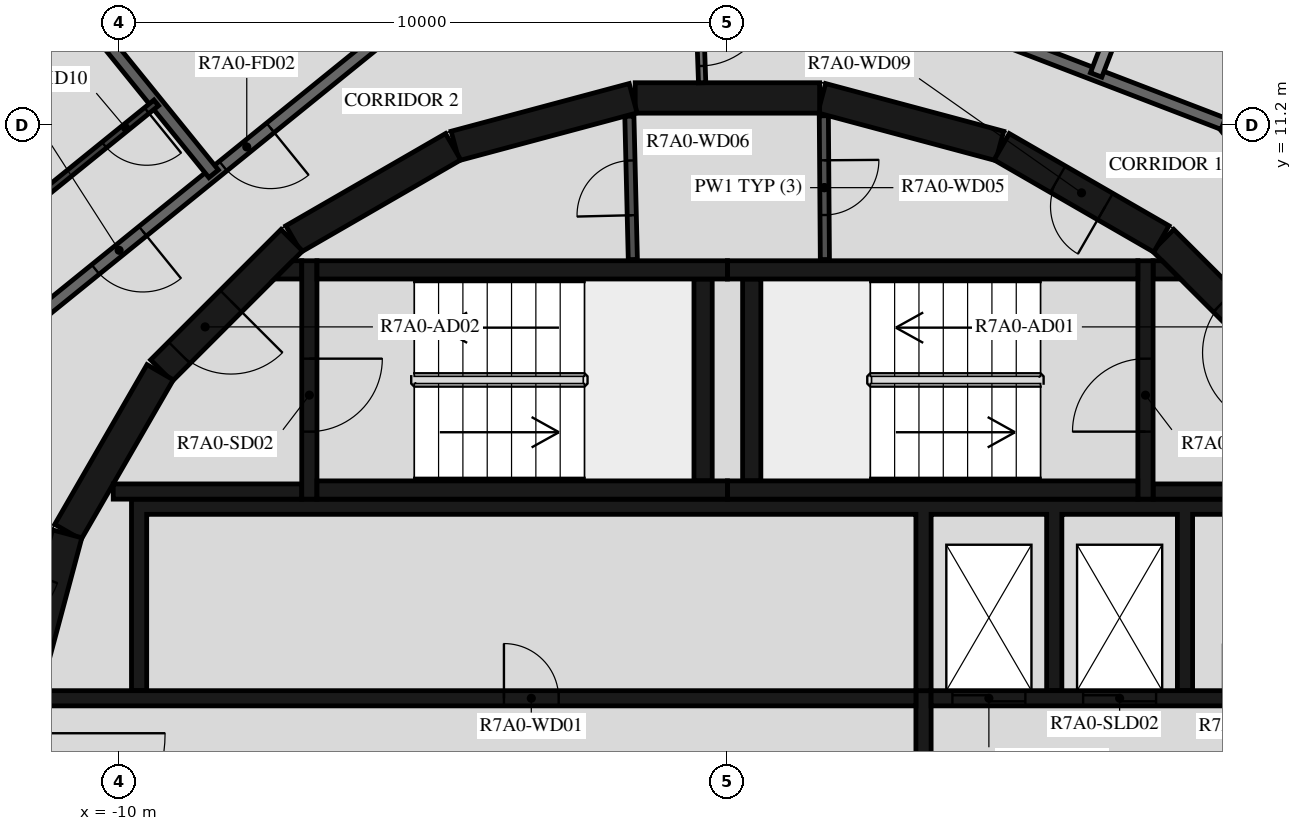
"""IFC4 building model, lengths in metres.
Left out: names, types, materials, properties, quantities, classifications, styles, units other than length and angle.
Written with IfcOpenShell. Run it as: python <this file> out.ifc"""

import sys

from ifc_helpers import new_model, si_unit, direction, frame, frame_2d, origin, place, context, subcontext, project, spatial, polyline, rectangle, outline, extrude, element, fill, save


model = new_model("IFC4")
c1 = context("Model", 3, precision=1e-05, world=origin(), true_north=direction((0.0, 1.0)))
c2 = subcontext(c1, "Body", "Model", "MODEL_VIEW")
j1 = project(units=[si_unit("LENGTHUNIT", "METRE"), si_unit("PLANEANGLEUNIT", "RADIAN")], contexts=[c1])
p1 = place(None, origin())
s1 = spatial("IfcSite", under=j1, at=p1, CompositionType="ELEMENT")
p2 = place(p1, origin())
s2 = spatial("IfcBuilding", under=s1, at=p2, CompositionType="ELEMENT")
p3 = place(p2, frame((0.0, 0.0, 263.4)))
s3 = spatial("IfcBuildingStorey", under=s2, at=p3, CompositionType="ELEMENT", Elevation=263.4)
p4 = place(p3, frame((-6.133, 25.046, 0.03), z_axis=(0.0, 0.0, 1.0), x_axis=(0.887010202007, -0.461749825701, 0.0)))
e1 = element("IfcWall", 1, at=p4, inside=s3, PredefinedType="PARAPET", context=c2, shape_type="SweptSolid", body=[
    extrude(rectangle(XDim=34.009, YDim=0.2, at=frame_2d((17.004, 0.0))), origin(), (0.0, 0.0, 1.0), 1.5),
])
p5 = place(p3, frame((9.308, 7.164, 0.0), z_axis=(0.0, 0.0, 1.0), x_axis=(-0.707106781187, 0.707106781187, 0.0)))
e2 = element("IfcWall", 2, at=p5, inside=s3, PredefinedType="SHEAR", context=c2, shape_type="SweptSolid", body=[
    extrude(rectangle(XDim=3.032, YDim=0.5, at=frame_2d((1.516, 0.0))), origin(), (0.0, 0.0, 1.0), 3.12),
])
p6 = place(p5, frame((0.416, 0.0, 0.0)))
e3 = element("IfcOpeningElement", 3, at=p6, cuts=e2, PredefinedType="OPENING", context=c2, shape_type="SweptSolid", body=[
    extrude(rectangle(XDim=1.2, YDim=2.1, at=frame_2d((0.6, 1.05))), frame((0.0, 0.26, 0.0), z_axis=(0.0, -1.0, 0.0), x_axis=(1.0, 0.0, 0.0)), (0.0, 0.0, 1.0), 0.52),
])
p7 = place(p3, frame((7.137, 9.329, 0.0), z_axis=(0.0, 0.0, 1.0), x_axis=(-0.865975092491, 0.500087131594, 0.0)))
e4 = element("IfcWall", 4, at=p7, inside=s3, PredefinedType="SHEAR", context=c2, shape_type="SweptSolid", body=[
    extrude(rectangle(XDim=3.033, YDim=0.5, at=frame_2d((1.516, 0.0))), origin(), (0.0, 0.0, 1.0), 3.12),
])
p8 = place(p7, frame((1.066, 0.0, 0.0)))
e5 = element("IfcOpeningElement", 5, at=p8, cuts=e4, PredefinedType="OPENING", context=c2, shape_type="SweptSolid", body=[
    extrude(rectangle(XDim=0.9, YDim=2.1, at=frame_2d((0.45, 1.05))), frame((0.0, 0.26, 0.0), z_axis=(0.0, -1.0, 0.0), x_axis=(1.0, 0.0, 0.0)), (0.0, 0.0, 1.0), 0.52),
])
for number, where, z_axis, x_axis in (
    (6, (4.479, 10.858, 0.0), (0.0, 0.0, 1.0), (-0.966, 0.259, 0.0)),
    (7, (1.516, 11.647, 0.0), (0.0, 0.0, 1.0), (-1.0, 0.0, 0.0)),
    (8, (-1.55, 11.643, 0.0), (0.0, 0.0, 1.0), (-0.966, -0.259, 0.0)),
    (9, (-4.51, 10.845, 0.0), (0.0, 0.0, 1.0), (-0.866, -0.5, 0.0)),
):
    element("IfcWall", number, at=place(p3, frame(where, z_axis=z_axis, x_axis=x_axis)), inside=s3, PredefinedType="SHEAR", context=c2, shape_type="SweptSolid", body=[
        extrude(rectangle(XDim=3.033, YDim=0.5, at=frame_2d((1.516, 0.0))), origin(), (0.0, 0.0, 1.0), 3.12),
    ])
p9 = place(p3, frame((-7.164, 9.308, 0.0), z_axis=(0.0, 0.0, 1.0), x_axis=(-0.707106781187, -0.707106781187, 0.0)))
e10 = element("IfcWall", 10, at=p9, inside=s3, PredefinedType="SHEAR", context=c2, shape_type="SweptSolid", body=[
    extrude(rectangle(XDim=3.032, YDim=0.5, at=frame_2d((1.516, 0.0))), origin(), (0.0, 0.0, 1.0), 3.12),
])
p10 = place(p9, frame((1.416, 0.0, 0.0)))
e11 = element("IfcOpeningElement", 11, at=p10, cuts=e10, PredefinedType="OPENING", context=c2, shape_type="SweptSolid", body=[
    extrude(rectangle(XDim=1.2, YDim=2.1, at=frame_2d((0.6, 1.05))), frame((0.0, 0.26, 0.0), z_axis=(0.0, -1.0, 0.0), x_axis=(1.0, 0.0, 0.0)), (0.0, 0.0, 1.0), 0.52),
])
for number, where, z_axis, x_axis in (
    (12, (-9.329, 7.137, 0.0), (0.0, 0.0, 1.0), (-0.5, -0.866, 0.0)),
    (13, (-10.858, 4.479, 0.0), (0.0, 0.0, 1.0), (-0.259, -0.966, 0.0)),
):
    element("IfcWall", number, at=place(p3, frame(where, z_axis=z_axis, x_axis=x_axis)), inside=s3, PredefinedType="SHEAR", context=c2, shape_type="SweptSolid", body=[
        extrude(rectangle(XDim=3.033, YDim=0.5, at=frame_2d((1.516, 0.0))), origin(), (0.0, 0.0, 1.0), 3.12),
    ])
for number, where, z_axis, x_axis in (
    (14, (0.0, 5.2, 0.0), (0.0, 0.0, 1.0), (1.0, 0.0, 0.0)),
    (15, (0.0, 8.82, 0.0), (0.0, 0.0, 1.0), (1.0, 0.0, 0.0)),
):
    element("IfcWall", number, at=place(p3, frame(where, z_axis=z_axis, x_axis=x_axis)), inside=s3, PredefinedType="SHEAR", context=c2, shape_type="SweptSolid", body=[
        extrude(rectangle(XDim=6.75, YDim=0.3, at=frame_2d((3.375, 0.0))), origin(), (0.0, 0.0, 1.0), 3.12),
    ])
p11 = place(p3, frame((0.4, 5.35, 0.0), z_axis=(0.0, 0.0, 1.0), x_axis=(0.0, 1.0, 0.0)))
e16 = element("IfcWall", 16, at=p11, inside=s3, PredefinedType="SHEAR", context=c2, shape_type="SweptSolid", body=[
    extrude(rectangle(XDim=3.32, YDim=0.3, at=frame_2d((1.66, 0.0))), origin(), (0.0, 0.0, 1.0), 3.12),
])
p12 = place(p3, frame((6.875, 5.05, 0.0), z_axis=(0.0, 0.0, 1.0), x_axis=(0.0, 1.0, 0.0)))
e17 = element("IfcWall", 17, at=p12, inside=s3, PredefinedType="SHEAR", context=c2, shape_type="SweptSolid", body=[
    extrude(rectangle(XDim=3.92, YDim=0.25, at=frame_2d((1.96, 0.0))), origin(), (0.0, 0.0, 1.0), 3.12),
])
p13 = place(p12, frame((1.11, 0.0, 0.0)))
e18 = element("IfcOpeningElement", 18, at=p13, cuts=e17, PredefinedType="OPENING", context=c2, shape_type="SweptSolid", body=[
    extrude(rectangle(XDim=1.2, YDim=2.1, at=frame_2d((0.6, 1.05))), frame((0.0, 0.135, 0.0), z_axis=(0.0, -1.0, 0.0), x_axis=(1.0, 0.0, 0.0)), (0.0, 0.0, 1.0), 0.27),
])
p14 = place(p3, frame((7.0, 5.175, 0.0), z_axis=(0.0, 0.0, 1.0), x_axis=(1.0, 0.0, 0.0)))
e19 = element("IfcWall", 19, at=p14, inside=s3, PredefinedType="SHEAR", context=c2, shape_type="SweptSolid", body=[
    extrude(rectangle(XDim=3.1, YDim=0.25, at=frame_2d((1.55, 0.0))), origin(), (0.0, 0.0, 1.0), 3.12),
])
p15 = place(p3, origin())
e20 = element("IfcWall", 20, at=p15, inside=s3, PredefinedType="SHEAR", context=c2, shape_type="SweptSolid", body=[
    extrude(outline(polyline([(7.448, 8.67), (7.0, 8.67), (7.0, 8.97), (7.148, 8.97), (7.448, 8.67)])), origin(), (0.0, 0.0, 1.0), 3.12),
])
for number, where, z_axis, x_axis in (
    (21, (-6.75, 5.2, 0.0), (0.0, 0.0, 1.0), (1.0, 0.0, 0.0)),
    (22, (-6.75, 8.82, 0.0), (0.0, 0.0, 1.0), (1.0, 0.0, 0.0)),
):
    element("IfcWall", number, at=place(p3, frame(where, z_axis=z_axis, x_axis=x_axis)), inside=s3, PredefinedType="SHEAR", context=c2, shape_type="SweptSolid", body=[
        extrude(rectangle(XDim=6.75, YDim=0.3, at=frame_2d((3.375, 0.0))), origin(), (0.0, 0.0, 1.0), 3.12),
    ])
p16 = place(p3, frame((-0.4, 5.35, 0.0), z_axis=(0.0, 0.0, 1.0), x_axis=(0.0, 1.0, 0.0)))
e23 = element("IfcWall", 23, at=p16, inside=s3, PredefinedType="SHEAR", context=c2, shape_type="SweptSolid", body=[
    extrude(rectangle(XDim=3.32, YDim=0.3, at=frame_2d((1.66, 0.0))), origin(), (0.0, 0.0, 1.0), 3.12),
])
p17 = place(p3, frame((-6.875, 8.97, 0.0), z_axis=(0.0, 0.0, 1.0), x_axis=(0.0, -1.0, 0.0)))
e24 = element("IfcWall", 24, at=p17, inside=s3, PredefinedType="SHEAR", context=c2, shape_type="SweptSolid", body=[
    extrude(rectangle(XDim=3.92, YDim=0.25, at=frame_2d((1.96, 0.0))), origin(), (0.0, 0.0, 1.0), 3.12),
])
p18 = place(p17, frame((1.61, 0.0, 0.0)))
e25 = element("IfcOpeningElement", 25, at=p18, cuts=e24, PredefinedType="OPENING", context=c2, shape_type="SweptSolid", body=[
    extrude(rectangle(XDim=1.2, YDim=2.1, at=frame_2d((0.6, 1.05))), frame((0.0, 0.135, 0.0), z_axis=(0.0, -1.0, 0.0), x_axis=(1.0, 0.0, 0.0)), (0.0, 0.0, 1.0), 0.27),
])
p19 = place(p3, frame((-7.0, 5.175, 0.0), z_axis=(0.0, 0.0, 1.0), x_axis=(-1.0, 0.0, 0.0)))
e26 = element("IfcWall", 26, at=p19, inside=s3, PredefinedType="SHEAR", context=c2, shape_type="SweptSolid", body=[
    extrude(rectangle(XDim=3.1, YDim=0.25, at=frame_2d((1.55, 0.0))), origin(), (0.0, 0.0, 1.0), 3.12),
])
p20 = place(p3, origin())
e27 = element("IfcWall", 27, at=p20, inside=s3, PredefinedType="SHEAR", context=c2, shape_type="SweptSolid", body=[
    extrude(outline(polyline([(-7.148, 8.97), (-7.0, 8.97), (-7.0, 8.67), (-7.448, 8.67), (-7.148, 8.97)])), origin(), (0.0, 0.0, 1.0), 3.12),
])
p21 = place(p3, origin())
e28 = element("IfcWall", 28, at=p21, inside=s3, PredefinedType="SHEAR", context=c2, shape_type="SweptSolid", body=[
    extrude(outline(polyline([(-9.8, 1.9), (-9.55, 1.9), (-9.55, 4.8), (3.1, 4.8), (3.1, 1.9), (3.35, 1.9), (3.35, 4.8), (5.25, 4.8), (5.25, 1.9), (5.5, 1.9), (5.5, 4.8), (7.4, 4.8), (7.4, 1.9), (7.65, 1.9), (7.65, 4.8), (9.55, 4.8), (9.55, 1.9), (9.8, 1.9), (9.8, 4.8), (9.8, 5.05), (-9.8, 5.05), (-9.8, 4.8), (-9.8, 1.9)])), origin(), (0.0, 0.0, 1.0), 3.12),
])
p22 = place(p3, frame((-11.28, 1.775, 0.0), z_axis=(0.0, 0.0, 1.0), x_axis=(1.0, 0.0, 0.0)))
e29 = element("IfcWall", 29, at=p22, inside=s3, PredefinedType="SHEAR", context=c2, shape_type="SweptSolid", body=[
    extrude(rectangle(XDim=14.38, YDim=0.25, at=frame_2d((7.19, 0.0))), origin(), (0.0, 0.0, 1.0), 3.12),
])
p23 = place(p22, frame((7.605, 0.0, 0.0)))
e30 = element("IfcOpeningElement", 30, at=p23, cuts=e29, PredefinedType="OPENING", context=c2, shape_type="SweptSolid", body=[
    extrude(rectangle(XDim=0.9, YDim=2.1, at=frame_2d((0.45, 1.05))), frame((0.0, 0.135, 0.0), z_axis=(0.0, -1.0, 0.0), x_axis=(1.0, 0.0, 0.0)), (0.0, 0.0, 1.0), 0.27),
])
p24 = place(p3, frame((3.35, 1.775, 0.0), z_axis=(0.0, 0.0, 1.0), x_axis=(1.0, 0.0, 0.0)))
e31 = element("IfcWall", 31, at=p24, inside=s3, PredefinedType="SHEAR", context=c2, shape_type="SweptSolid", body=[
    extrude(rectangle(XDim=7.93, YDim=0.25, at=frame_2d((3.965, 0.0))), origin(), (0.0, 0.0, 1.0), 3.12),
])
p25 = place(p24, frame((0.35, 0.0, 0.0)))
e32 = element("IfcOpeningElement", 32, at=p25, cuts=e31, PredefinedType="OPENING", context=c2, shape_type="SweptSolid", body=[
    extrude(rectangle(XDim=1.2, YDim=2.4, at=frame_2d((0.6, 1.2))), frame((0.0, 0.135, 0.0), z_axis=(0.0, -1.0, 0.0), x_axis=(1.0, 0.0, 0.0)), (0.0, 0.0, 1.0), 0.27),
])
p26 = place(p24, frame((2.5, 0.0, 0.0)))
e33 = element("IfcOpeningElement", 33, at=p26, cuts=e31, PredefinedType="OPENING", context=c2, shape_type="SweptSolid", body=[
    extrude(rectangle(XDim=1.2, YDim=2.4, at=frame_2d((0.6, 1.2))), frame((0.0, 0.135, 0.0), z_axis=(0.0, -1.0, 0.0), x_axis=(1.0, 0.0, 0.0)), (0.0, 0.0, 1.0), 0.27),
])
p27 = place(p24, frame((4.8, 0.0, 0.0)))
e34 = element("IfcOpeningElement", 34, at=p27, cuts=e31, PredefinedType="OPENING", context=c2, shape_type="SweptSolid", body=[
    extrude(rectangle(XDim=0.9, YDim=2.1, at=frame_2d((0.45, 1.05))), frame((0.0, 0.135, 0.0), z_axis=(0.0, -1.0, 0.0), x_axis=(1.0, 0.0, 0.0)), (0.0, 0.0, 1.0), 0.27),
])
p28 = place(p3, frame((3.225, -1.9, 0.0), z_axis=(0.0, 0.0, 1.0), x_axis=(0.0, 1.0, 0.0)))
e35 = element("IfcWall", 35, at=p28, inside=s3, PredefinedType="SHEAR", context=c2, shape_type="SweptSolid", body=[
    extrude(rectangle(XDim=3.8, YDim=0.25, at=frame_2d((1.9, 0.0))), origin(), (0.0, 0.0, 1.0), 3.12),
])
p29 = place(p3, frame((1.586, 11.354, 0.0), z_axis=(0.0, 0.0, 1.0), x_axis=(0.007227482881, -0.999973881405, 0.0)))
e36 = element("IfcWall", 36, at=p29, inside=s3, PredefinedType="PARTITIONING", context=c2, shape_type="SweptSolid", body=[
    extrude(rectangle(XDim=2.365, YDim=0.15, at=frame_2d((1.182, 0.0))), origin(), (0.0, 0.0, 1.0), 3.12),
])
p30 = place(p29, frame((0.732, 0.0, 0.0)))
e37 = element("IfcOpeningElement", 37, at=p30, cuts=e36, PredefinedType="OPENING", context=c2, shape_type="SweptSolid", body=[
    extrude(rectangle(XDim=0.9, YDim=2.1, at=frame_2d((0.45, 1.05))), frame((0.0, 0.085, 0.0), z_axis=(0.0, -1.0, 0.0), x_axis=(1.0, 0.0, 0.0)), (0.0, 0.0, 1.0), 0.17),
])
p31 = place(p3, frame((-1.555, 8.99, 0.0), z_axis=(0.0, 0.0, 1.0), x_axis=(-0.024125549686, 0.999708936567, 0.0)))
e38 = element("IfcWall", 38, at=p31, inside=s3, PredefinedType="PARTITIONING", context=c2, shape_type="SweptSolid", body=[
    extrude(rectangle(XDim=2.358, YDim=0.15, at=frame_2d((1.179, 0.0))), origin(), (0.0, 0.0, 1.0), 3.12),
])
p32 = place(p31, frame((0.729, 0.0, 0.0)))
e39 = element("IfcOpeningElement", 39, at=p32, cuts=e38, PredefinedType="OPENING", context=c2, shape_type="SweptSolid", body=[
    extrude(rectangle(XDim=0.9, YDim=2.1, at=frame_2d((0.45, 1.05))), frame((0.0, 0.085, 0.0), z_axis=(0.0, -1.0, 0.0), x_axis=(1.0, 0.0, 0.0)), (0.0, 0.0, 1.0), 0.17),
])
p33 = place(p3, frame((-0.471, 13.492, 0.0), z_axis=(0.0, 0.0, 1.0), x_axis=(0.034873173869, -0.999391745886, 0.0)))
e40 = element("IfcWall", 40, at=p33, inside=s3, PredefinedType="PARTITIONING", context=c2, shape_type="SweptSolid", body=[
    extrude(rectangle(XDim=1.596, YDim=0.12, at=frame_2d((0.798, 0.0))), origin(), (0.0, 0.0, 1.0), 3.12),
])
p34 = place(p33, frame((0.12, 0.0, 0.0)))
e41 = element("IfcOpeningElement", 41, at=p34, cuts=e40, PredefinedType="OPENING", context=c2, shape_type="SweptSolid", body=[
    extrude(rectangle(XDim=1.2, YDim=2.1, at=frame_2d((0.6, 1.05))), frame((0.0, 0.07, 0.0), z_axis=(0.0, -1.0, 0.0), x_axis=(1.0, 0.0, 0.0)), (0.0, 0.0, 1.0), 0.14),
])
p35 = place(p3, frame((12.673, 5.643, 0.0), z_axis=(0.0, 0.0, 1.0), x_axis=(-0.629302871585, 0.777160148113, 0.0)))
e42 = element("IfcWall", 42, at=p35, inside=s3, PredefinedType="STANDARD", context=c2, shape_type="SweptSolid", body=[
    extrude(rectangle(XDim=7.181, YDim=0.2, at=frame_2d((3.59, 0.0))), origin(), (0.0, 0.0, 1.0), 3.12),
])
p36 = place(p35, frame((4.1, 0.0, 0.0)))
e43 = element("IfcOpeningElement", 43, at=p36, cuts=e42, PredefinedType="OPENING", context=c2, shape_type="SweptSolid", body=[
    extrude(rectangle(XDim=1.0, YDim=2.1, at=frame_2d((0.5, 1.05))), frame((0.0, 0.11, 0.0), z_axis=(0.0, -1.0, 0.0), x_axis=(1.0, 0.0, 0.0)), (0.0, 0.0, 1.0), 0.22),
])
p37 = place(p3, frame((8.154, 11.223, 0.0), z_axis=(0.0, 0.0, 1.0), x_axis=(-0.93359073609, 0.358341090983, 0.0)))
e44 = element("IfcWall", 44, at=p37, inside=s3, PredefinedType="STANDARD", context=c2, shape_type="SweptSolid", body=[
    extrude(rectangle(XDim=7.181, YDim=0.2, at=frame_2d((3.59, 0.0))), origin(), (0.0, 0.0, 1.0), 3.12),
])
p38 = place(p3, frame((-5.643, 12.673, 0.0), z_axis=(0.0, 0.0, 1.0), x_axis=(-0.777160148113, -0.629302871585, 0.0)))
e45 = element("IfcWall", 45, at=p38, inside=s3, PredefinedType="STANDARD", context=c2, shape_type="SweptSolid", body=[
    extrude(rectangle(XDim=7.181, YDim=0.2, at=frame_2d((3.59, 0.0))), origin(), (0.0, 0.0, 1.0), 3.12),
])
p39 = place(p38, frame((2.41, 0.0, 0.0)))
e46 = element("IfcOpeningElement", 46, at=p39, cuts=e45, PredefinedType="OPENING", context=c2, shape_type="SweptSolid", body=[
    extrude(rectangle(XDim=1.0, YDim=2.1, at=frame_2d((0.5, 1.05))), frame((0.0, 0.11, 0.0), z_axis=(0.0, -1.0, 0.0), x_axis=(1.0, 0.0, 0.0)), (0.0, 0.0, 1.0), 0.22),
])
p40 = place(p38, frame((5.112, 0.0, 0.0)))
e47 = element("IfcOpeningElement", 47, at=p40, cuts=e45, PredefinedType="OPENING", context=c2, shape_type="SweptSolid", body=[
    extrude(rectangle(XDim=1.0, YDim=2.1, at=frame_2d((0.5, 1.05))), frame((0.0, 0.11, 0.0), z_axis=(0.0, -1.0, 0.0), x_axis=(1.0, 0.0, 0.0)), (0.0, 0.0, 1.0), 0.22),
])
p41 = place(p3, frame((7.532, 15.85, 0.0), z_axis=(0.0, 0.0, 1.0), x_axis=(-0.358355996975, -0.933585014571, 0.0)))
e48 = element("IfcWall", 48, at=p41, inside=s3, PredefinedType="STANDARD", context=c2, shape_type="SweptSolid", body=[
    extrude(rectangle(XDim=4.096, YDim=0.2, at=frame_2d((2.048, 0.0))), origin(), (0.0, 0.0, 1.0), 2.73),
])
p42 = place(p3, frame((-10.796, 13.299, 0.0), z_axis=(0.0, 0.0, 1.0), x_axis=(0.629290499381, -0.777170166301, 0.0)))
e49 = element("IfcWall", 49, at=p42, inside=s3, PredefinedType="STANDARD", context=c2, shape_type="SweptSolid", body=[
    extrude(rectangle(XDim=3.729, YDim=0.2, at=frame_2d((1.865, 0.0))), origin(), (0.0, 0.0, 1.0), 3.12),
])
p43 = place(p3, frame((-9.393, 11.566, 0.0), z_axis=(0.0, 0.0, 1.0), x_axis=(-0.777100258587, -0.629376825205, 0.0)))
e50 = element("IfcWall", 50, at=p43, inside=s3, PredefinedType="PARTITIONING", context=c2, shape_type="SweptSolid", body=[
    extrude(rectangle(XDim=3.971, YDim=0.12, at=frame_2d((1.986, 0.0))), origin(), (0.0, 0.0, 1.0), 3.12),
])
p44 = place(p43, frame((0.2, 0.0, 0.0)))
e51 = element("IfcOpeningElement", 51, at=p44, cuts=e50, PredefinedType="OPENING", context=c2, shape_type="SweptSolid", body=[
    extrude(rectangle(XDim=0.9, YDim=2.1, at=frame_2d((0.45, 1.05))), frame((0.0, 0.07, 0.0), z_axis=(0.0, -1.0, 0.0), x_axis=(1.0, 0.0, 0.0)), (0.0, 0.0, 1.0), 0.14),
])
p45 = place(p13, origin())
e52 = element("IfcDoor", 52, at=p45, inside=s3, OperationType="SINGLE_SWING_LEFT", PredefinedType="DOOR", context=c2, shape_type="SweptSolid", body=[
    extrude(rectangle(XDim=1.2, YDim=2.1, at=frame_2d((0.6, 1.05))), frame((0.0, 0.025, 0.0), z_axis=(0.0, -1.0, 0.0), x_axis=(1.0, 0.0, 0.0)), (0.0, 0.0, 1.0), 0.05),
])
fill(e18, e52)
p46 = place(p6, origin())
e53 = element("IfcDoor", 53, at=p46, inside=s3, OperationType="SINGLE_SWING_RIGHT", PredefinedType="DOOR", context=c2, shape_type="SweptSolid", body=[
    extrude(rectangle(XDim=1.2, YDim=2.1, at=frame_2d((0.6, 1.05))), frame((0.0, 0.025, 0.0), z_axis=(0.0, -1.0, 0.0), x_axis=(1.0, 0.0, 0.0)), (0.0, 0.0, 1.0), 0.05),
])
fill(e3, e53)
p47 = place(p18, origin())
e54 = element("IfcDoor", 54, at=p47, inside=s3, OperationType="SINGLE_SWING_LEFT", PredefinedType="DOOR", context=c2, shape_type="SweptSolid", body=[
    extrude(rectangle(XDim=1.2, YDim=2.1, at=frame_2d((0.6, 1.05))), frame((0.0, 0.025, 0.0), z_axis=(0.0, -1.0, 0.0), x_axis=(1.0, 0.0, 0.0)), (0.0, 0.0, 1.0), 0.05),
])
fill(e25, e54)
p48 = place(p10, origin())
e55 = element("IfcDoor", 55, at=p48, inside=s3, OperationType="SINGLE_SWING_RIGHT", PredefinedType="DOOR", context=c2, shape_type="SweptSolid", body=[
    extrude(rectangle(XDim=1.2, YDim=2.1, at=frame_2d((0.6, 1.05))), frame((0.0, 0.025, 0.0), z_axis=(0.0, -1.0, 0.0), x_axis=(1.0, 0.0, 0.0)), (0.0, 0.0, 1.0), 0.05),
])
fill(e11, e55)
p49 = place(p25, origin())
e56 = element("IfcDoor", 56, at=p49, inside=s3, OperationType="DOUBLE_DOOR_SLIDING", PredefinedType="DOOR", context=c2, shape_type="SweptSolid", body=[
    extrude(rectangle(XDim=1.2, YDim=2.4, at=frame_2d((0.6, 1.2))), frame((0.0, 0.025, 0.0), z_axis=(0.0, -1.0, 0.0), x_axis=(1.0, 0.0, 0.0)), (0.0, 0.0, 1.0), 0.05),
])
fill(e32, e56)
p50 = place(p26, origin())
e57 = element("IfcDoor", 57, at=p50, inside=s3, OperationType="DOUBLE_DOOR_SLIDING", PredefinedType="DOOR", context=c2, shape_type="SweptSolid", body=[
    extrude(rectangle(XDim=1.2, YDim=2.4, at=frame_2d((0.6, 1.2))), frame((0.0, 0.025, 0.0), z_axis=(0.0, -1.0, 0.0), x_axis=(1.0, 0.0, 0.0)), (0.0, 0.0, 1.0), 0.05),
])
fill(e33, e57)
p51 = place(p23, origin())
e58 = element("IfcDoor", 58, at=p51, inside=s3, OperationType="SINGLE_SWING_LEFT", PredefinedType="DOOR", context=c2, shape_type="SweptSolid", body=[
    extrude(rectangle(XDim=0.9, YDim=2.1, at=frame_2d((0.45, 1.05))), frame((0.0, 0.025, 0.0), z_axis=(0.0, -1.0, 0.0), x_axis=(1.0, 0.0, 0.0)), (0.0, 0.0, 1.0), 0.05),
])
fill(e30, e58)
p52 = place(p30, origin())
e59 = element("IfcDoor", 59, at=p52, inside=s3, OperationType="SINGLE_SWING_LEFT", PredefinedType="DOOR", context=c2, shape_type="SweptSolid", body=[
    extrude(rectangle(XDim=0.9, YDim=2.1, at=frame_2d((0.45, 1.05))), frame((0.0, 0.025, 0.0), z_axis=(0.0, -1.0, 0.0), x_axis=(1.0, 0.0, 0.0)), (0.0, 0.0, 1.0), 0.05),
])
fill(e37, e59)
p53 = place(p32, origin())
e60 = element("IfcDoor", 60, at=p53, inside=s3, OperationType="SINGLE_SWING_RIGHT", PredefinedType="DOOR", context=c2, shape_type="SweptSolid", body=[
    extrude(rectangle(XDim=0.9, YDim=2.1, at=frame_2d((0.45, 1.05))), frame((0.0, 0.025, 0.0), z_axis=(0.0, -1.0, 0.0), x_axis=(1.0, 0.0, 0.0)), (0.0, 0.0, 1.0), 0.05),
])
fill(e39, e60)
p54 = place(p8, origin())
e61 = element("IfcDoor", 61, at=p54, inside=s3, OperationType="SINGLE_SWING_LEFT", PredefinedType="DOOR", context=c2, shape_type="SweptSolid", body=[
    extrude(rectangle(XDim=0.9, YDim=2.1, at=frame_2d((0.45, 1.05))), frame((0.0, 0.025, 0.0), z_axis=(0.0, -1.0, 0.0), x_axis=(1.0, 0.0, 0.0)), (0.0, 0.0, 1.0), 0.05),
])
fill(e5, e61)
p55 = place(p39, origin())
e62 = element("IfcDoor", 62, at=p55, inside=s3, OperationType="SINGLE_SWING_RIGHT", PredefinedType="DOOR", context=c2, shape_type="SweptSolid", body=[
    extrude(rectangle(XDim=1.0, YDim=2.1, at=frame_2d((0.5, 1.05))), frame((0.0, 0.025, 0.0), z_axis=(0.0, -1.0, 0.0), x_axis=(1.0, 0.0, 0.0)), (0.0, 0.0, 1.0), 0.05),
])
fill(e46, e62)
p56 = place(p40, origin())
e63 = element("IfcDoor", 63, at=p56, inside=s3, OperationType="SINGLE_SWING_LEFT", PredefinedType="DOOR", context=c2, shape_type="SweptSolid", body=[
    extrude(rectangle(XDim=1.0, YDim=2.1, at=frame_2d((0.5, 1.05))), frame((0.0, 0.025, 0.0), z_axis=(0.0, -1.0, 0.0), x_axis=(1.0, 0.0, 0.0)), (0.0, 0.0, 1.0), 0.05),
])
fill(e47, e63)
p57 = place(p44, origin())
e64 = element("IfcDoor", 64, at=p57, inside=s3, OperationType="SINGLE_SWING_LEFT", PredefinedType="DOOR", context=c2, shape_type="SweptSolid", body=[
    extrude(rectangle(XDim=0.9, YDim=2.1, at=frame_2d((0.45, 1.05))), frame((0.0, 0.025, 0.0), z_axis=(0.0, -1.0, 0.0), x_axis=(1.0, 0.0, 0.0)), (0.0, 0.0, 1.0), 0.05),
])
fill(e51, e64)
p58 = place(p34, origin())
e65 = element("IfcDoor", 65, at=p58, inside=s3, OperationType="DOUBLE_DOOR_SINGLE_SWING", PredefinedType="DOOR", context=c2, shape_type="SweptSolid", body=[
    extrude(rectangle(XDim=1.2, YDim=2.1, at=frame_2d((0.6, 1.05))), frame((0.0, 0.025, 0.0), z_axis=(0.0, -1.0, 0.0), x_axis=(1.0, 0.0, 0.0)), (0.0, 0.0, 1.0), 0.05),
])
fill(e41, e65)
save(model, sys.argv[1])
